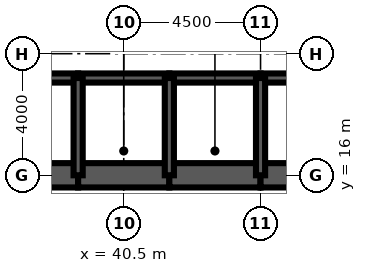
"""IFC4 building model, lengths in metres.
Left out: names, types, materials, properties, quantities, classifications, styles, units other than length and angle.
Written with IfcOpenShell. Run it as: python <this file> out.ifc"""

import sys

from ifc_helpers import new_model, si_unit, direction, frame, frame_2d, origin, place, context, subcontext, project, spatial, rectangle, extrude, element, fill, save


model = new_model("IFC4")
c1 = context("Model", 3, precision=1e-05, world=origin(), true_north=direction((0.0, 1.0)))
c2 = subcontext(c1, "Body", "Model", "MODEL_VIEW")
j1 = project(units=[si_unit("LENGTHUNIT", "METRE"), si_unit("PLANEANGLEUNIT", "RADIAN")], contexts=[c1])
p1 = place(None, origin())
s1 = spatial("IfcSite", under=j1, at=p1, CompositionType="ELEMENT")
p2 = place(p1, origin())
s2 = spatial("IfcBuilding", under=s1, at=p2, CompositionType="ELEMENT")
p3 = place(p2, frame((0.0, 0.0, 190.0)))
s3 = spatial("IfcBuildingStorey", under=s2, at=p3, CompositionType="ELEMENT", Elevation=190.0)
for number, where, z_axis, x_axis in (
    (1, (36.0, 16.0, 0.0), (0.0, 0.0, 1.0), (1.0, 0.0, 0.0)),
    (2, (39.0, 16.0, 0.0), (0.0, 0.0, 1.0), (1.0, 0.0, 0.0)),
    (3, (42.0, 16.0, 0.0), (0.0, 0.0, 1.0), (1.0, 0.0, 0.0)),
):
    element("IfcWall", number, at=place(p3, frame(where, z_axis=z_axis, x_axis=x_axis)), inside=s3, PredefinedType="SHEAR", context=c2, shape_type="SweptSolid", body=[
        extrude(rectangle(XDim=3.0, YDim=0.8, at=frame_2d((1.5, 0.0))), origin(), (0.0, 0.0, 1.0), 4.2),
    ])
p4 = place(p3, frame((45.0, 16.0, 0.0), z_axis=(0.0, 0.0, 1.0), x_axis=(1.0, 0.0, 0.0)))
e4 = element("IfcWall", 4, at=p4, inside=s3, PredefinedType="SHEAR", context=c2, shape_type="SweptSolid", body=[
    extrude(rectangle(XDim=9.4, YDim=0.8, at=frame_2d((4.7, 0.0))), origin(), (0.0, 0.0, 1.0), 4.2),
])
p5 = place(p3, frame((36.0, 19.2, 0.0), z_axis=(0.0, 0.0, 1.0), x_axis=(1.0, 0.0, 0.0)))
e5 = element("IfcWall", 5, at=p5, inside=s3, PredefinedType="SOLIDWALL", context=c2, shape_type="SweptSolid", body=[
    extrude(rectangle(XDim=3.0, YDim=0.3, at=frame_2d((1.5, 0.0))), origin(), (0.0, 0.0, 1.0), 4.2),
])
p6 = place(p5, frame((0.95, 0.0, 0.0)))
e6 = element("IfcOpeningElement", 6, at=p6, cuts=e5, PredefinedType="OPENING", context=c2, shape_type="SweptSolid", body=[
    extrude(rectangle(XDim=1.1, YDim=2.2, at=frame_2d((0.55, 1.1))), frame((0.0, 0.16, 0.0), z_axis=(0.0, -1.0, 0.0), x_axis=(1.0, 0.0, 0.0)), (0.0, 0.0, 1.0), 0.32),
])
p7 = place(p3, frame((39.0, 19.2, 0.0), z_axis=(0.0, 0.0, 1.0), x_axis=(1.0, 0.0, 0.0)))
e7 = element("IfcWall", 7, at=p7, inside=s3, PredefinedType="SOLIDWALL", context=c2, shape_type="SweptSolid", body=[
    extrude(rectangle(XDim=3.0, YDim=0.3, at=frame_2d((1.5, 0.0))), origin(), (0.0, 0.0, 1.0), 4.2),
])
p8 = place(p7, frame((1.0, 0.0, 0.0)))
e8 = element("IfcOpeningElement", 8, at=p8, cuts=e7, PredefinedType="OPENING", context=c2, shape_type="SweptSolid", body=[
    extrude(rectangle(XDim=1.0, YDim=2.1, at=frame_2d((0.5, 1.05))), frame((0.0, 0.16, 0.0), z_axis=(0.0, -1.0, 0.0), x_axis=(1.0, 0.0, 0.0)), (0.0, 0.0, 1.0), 0.32),
])
p9 = place(p3, frame((42.0, 19.2, 0.0), z_axis=(0.0, 0.0, 1.0), x_axis=(1.0, 0.0, 0.0)))
e9 = element("IfcWall", 9, at=p9, inside=s3, PredefinedType="SOLIDWALL", context=c2, shape_type="SweptSolid", body=[
    extrude(rectangle(XDim=3.0, YDim=0.3, at=frame_2d((1.5, 0.0))), origin(), (0.0, 0.0, 1.0), 4.2),
])
p10 = place(p9, frame((1.0, 0.0, 0.0)))
e10 = element("IfcOpeningElement", 10, at=p10, cuts=e9, PredefinedType="OPENING", context=c2, shape_type="SweptSolid", body=[
    extrude(rectangle(XDim=1.0, YDim=2.1, at=frame_2d((0.5, 1.05))), frame((0.0, 0.16, 0.0), z_axis=(0.0, -1.0, 0.0), x_axis=(1.0, 0.0, 0.0)), (0.0, 0.0, 1.0), 0.32),
])
p11 = place(p3, frame((45.0, 19.2, 0.0), z_axis=(0.0, 0.0, 1.0), x_axis=(1.0, 0.0, 0.0)))
e11 = element("IfcWall", 11, at=p11, inside=s3, PredefinedType="SOLIDWALL", context=c2, shape_type="SweptSolid", body=[
    extrude(rectangle(XDim=9.0, YDim=0.3, at=frame_2d((4.5, 0.0))), origin(), (0.0, 0.0, 1.0), 4.2),
])
p12 = place(p11, frame((7.35, 0.0, 0.0)))
e12 = element("IfcOpeningElement", 12, at=p12, cuts=e11, PredefinedType="OPENING", context=c2, shape_type="SweptSolid", body=[
    extrude(rectangle(XDim=1.0, YDim=2.1, at=frame_2d((0.5, 1.05))), frame((0.0, 0.16, 0.0), z_axis=(0.0, -1.0, 0.0), x_axis=(1.0, 0.0, 0.0)), (0.0, 0.0, 1.0), 0.32),
])
for number, where, z_axis, x_axis in (
    (13, (39.0, 16.0, 0.0), (0.0, 0.0, 1.0), (0.0, 1.0, 0.0)),
    (14, (42.0, 16.0, 0.0), (0.0, 0.0, 1.0), (0.0, 1.0, 0.0)),
    (15, (45.0, 16.0, 0.0), (0.0, 0.0, 1.0), (0.0, 1.0, 0.0)),
):
    element("IfcWall", number, at=place(p3, frame(where, z_axis=z_axis, x_axis=x_axis)), inside=s3, PredefinedType="SOLIDWALL", context=c2, shape_type="SweptSolid", body=[
        extrude(rectangle(XDim=3.2, YDim=0.3, at=frame_2d((1.6, 0.0))), origin(), (0.0, 0.0, 1.0), 4.2),
    ])
p13 = place(p3, frame((39.15, 17.35, 0.0), z_axis=(0.0, 0.0, 1.0), x_axis=(1.0, 0.0, 0.0)))
e16 = element("IfcWall", 16, at=p13, inside=s3, PredefinedType="SOLIDWALL", context=c2, shape_type="SweptSolid", body=[
    extrude(rectangle(XDim=2.7, YDim=0.3, at=frame_2d((1.35, 0.0))), origin(), (0.0, 0.0, 1.0), 4.04),
])
p14 = place(p13, frame((0.85, 0.0, 0.0)))
e17 = element("IfcOpeningElement", 17, at=p14, cuts=e16, PredefinedType="OPENING", context=c2, shape_type="SweptSolid", body=[
    extrude(rectangle(XDim=1.0, YDim=2.1, at=frame_2d((0.5, 1.05))), frame((0.0, 0.16, 0.0), z_axis=(0.0, -1.0, 0.0), x_axis=(1.0, 0.0, 0.0)), (0.0, 0.0, 1.0), 0.32),
])
p15 = place(p3, frame((42.15, 17.35, 0.0), z_axis=(0.0, 0.0, 1.0), x_axis=(1.0, 0.0, 0.0)))
e18 = element("IfcWall", 18, at=p15, inside=s3, PredefinedType="SOLIDWALL", context=c2, shape_type="SweptSolid", body=[
    extrude(rectangle(XDim=2.7, YDim=0.3, at=frame_2d((1.35, 0.0))), origin(), (0.0, 0.0, 1.0), 4.04),
])
p16 = place(p15, frame((0.85, 0.0, 0.0)))
e19 = element("IfcOpeningElement", 19, at=p16, cuts=e18, PredefinedType="OPENING", context=c2, shape_type="SweptSolid", body=[
    extrude(rectangle(XDim=1.0, YDim=2.1, at=frame_2d((0.5, 1.05))), frame((0.0, 0.16, 0.0), z_axis=(0.0, -1.0, 0.0), x_axis=(1.0, 0.0, 0.0)), (0.0, 0.0, 1.0), 0.32),
])
p17 = place(p14, origin())
e20 = element("IfcDoor", 20, at=p17, inside=s3, OperationType="SINGLE_SWING_LEFT", PredefinedType="DOOR", context=c2, shape_type="SweptSolid", body=[
    extrude(rectangle(XDim=1.0, YDim=2.1, at=frame_2d((0.5, 1.05))), frame((0.0, 0.025, 0.0), z_axis=(0.0, -1.0, 0.0), x_axis=(1.0, 0.0, 0.0)), (0.0, 0.0, 1.0), 0.05),
])
fill(e17, e20)
p18 = place(p16, origin())
e21 = element("IfcDoor", 21, at=p18, inside=s3, OperationType="SINGLE_SWING_LEFT", PredefinedType="DOOR", context=c2, shape_type="SweptSolid", body=[
    extrude(rectangle(XDim=1.0, YDim=2.1, at=frame_2d((0.5, 1.05))), frame((0.0, 0.025, 0.0), z_axis=(0.0, -1.0, 0.0), x_axis=(1.0, 0.0, 0.0)), (0.0, 0.0, 1.0), 0.05),
])
fill(e19, e21)
p19 = place(p8, origin())
e22 = element("IfcDoor", 22, at=p19, inside=s3, OperationType="SINGLE_SWING_LEFT", PredefinedType="DOOR", context=c2, shape_type="SweptSolid", body=[
    extrude(rectangle(XDim=1.0, YDim=2.1, at=frame_2d((0.5, 1.05))), frame((0.0, 0.025, 0.0), z_axis=(0.0, -1.0, 0.0), x_axis=(1.0, 0.0, 0.0)), (0.0, 0.0, 1.0), 0.05),
])
fill(e8, e22)
p20 = place(p10, origin())
e23 = element("IfcDoor", 23, at=p20, inside=s3, OperationType="SINGLE_SWING_LEFT", PredefinedType="DOOR", context=c2, shape_type="SweptSolid", body=[
    extrude(rectangle(XDim=1.0, YDim=2.1, at=frame_2d((0.5, 1.05))), frame((0.0, 0.025, 0.0), z_axis=(0.0, -1.0, 0.0), x_axis=(1.0, 0.0, 0.0)), (0.0, 0.0, 1.0), 0.05),
])
fill(e10, e23)
save(model, sys.argv[1])
